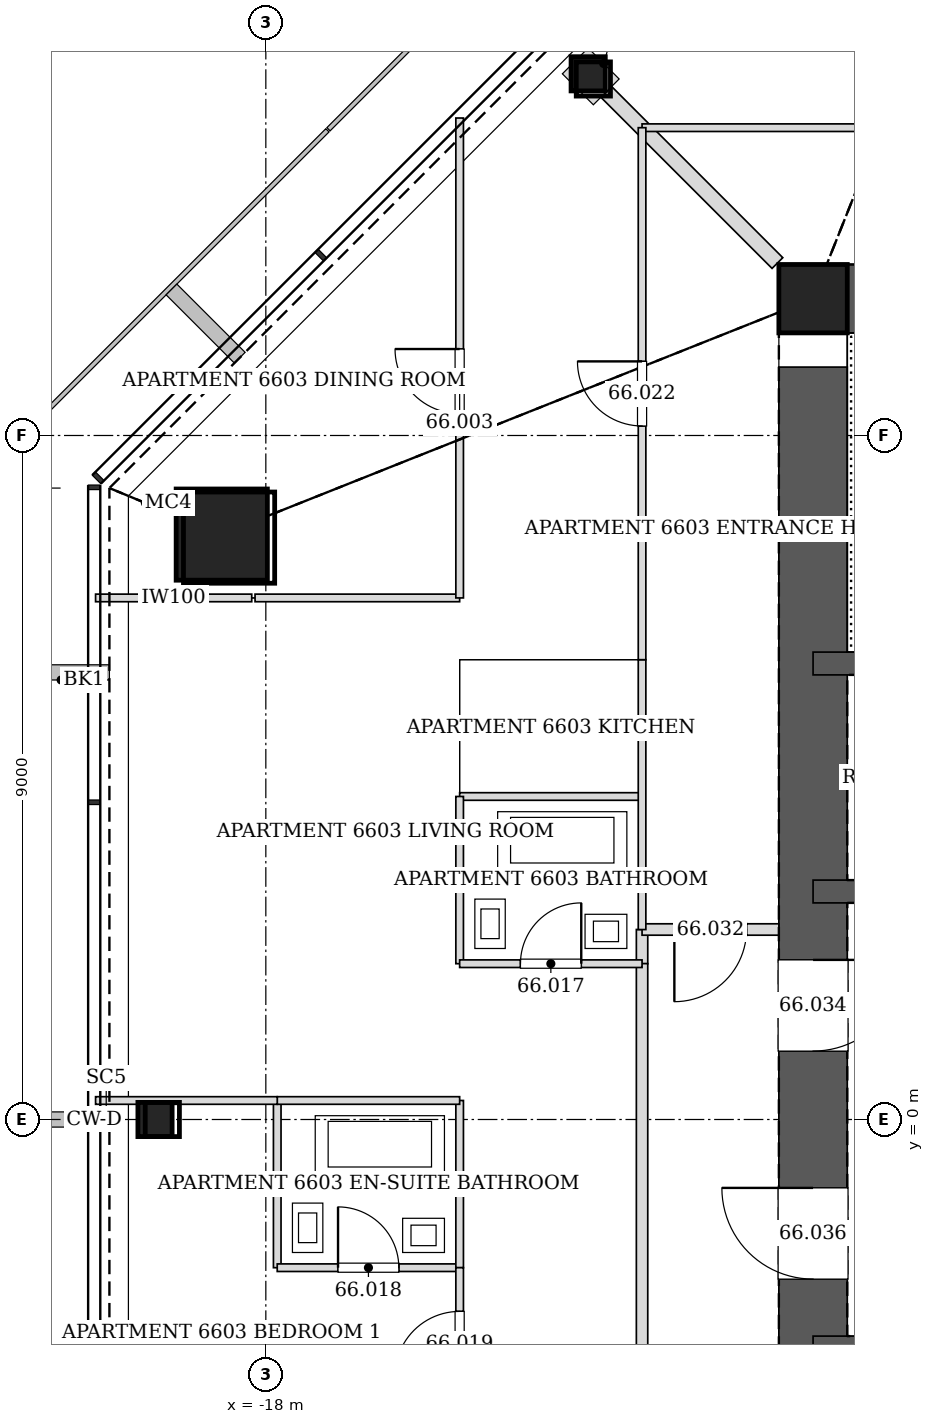
"""IFC4 building model, lengths in metres.
Left out: names, types, materials, properties, quantities, classifications, styles, units other than length and angle.
Written with IfcOpenShell. Run it as: python <this file> out.ifc"""

import sys

from ifc_helpers import new_model, si_unit, direction, frame, frame_2d, origin, origin_2d, place, context, subcontext, project, spatial, rectangle, hollow_rectangle, extrude, element, fill, save


model = new_model("IFC4")
c1 = context("Model", 3, precision=1e-05, world=origin(), true_north=direction((0.0, 1.0)))
c2 = subcontext(c1, "Body", "Model", "MODEL_VIEW")
j1 = project(units=[si_unit("LENGTHUNIT", "METRE"), si_unit("PLANEANGLEUNIT", "RADIAN")], contexts=[c1])
p1 = place(None, origin())
s1 = spatial("IfcSite", under=j1, at=p1, CompositionType="ELEMENT")
p2 = place(p1, origin())
s2 = spatial("IfcBuilding", under=s1, at=p2, CompositionType="ELEMENT")
p3 = place(p2, frame((0.0, 0.0, 274.2)))
s3 = spatial("IfcBuildingStorey", under=s2, at=p3, CompositionType="ELEMENT", Elevation=274.2)
p4 = place(p3, frame((-18.58, 7.696, 0.0), z_axis=(0.028277121884, -0.011698403216, 0.999531666202), x_axis=(0.382282742426, 0.924045401938, 0.0)))
e1 = element("IfcColumn", 1, at=p4, inside=s3, PredefinedType="COLUMN", context=c2, shape_type="SweptSolid", body=[
    extrude(hollow_rectangle(XDim=1.2, YDim=1.2, WallThickness=0.055, at=origin_2d()), origin(), (0.0, 0.0, 1.0), 3.402),
])
for number, where, z_axis, x_axis in (
    (2, (-13.759, 13.759, 0.0), (0.02, -0.02, 1.0), (0.707, 0.707, 0.0)),
    (3, (-19.458, 0.0, 0.0), (0.028, 0.0, 1.0), (0.0, 1.0, 0.0)),
):
    element("IfcColumn", number, at=place(p3, frame(where, z_axis=z_axis, x_axis=x_axis)), inside=s3, PredefinedType="COLUMN", context=c2, shape_type="SweptSolid", body=[
        extrude(hollow_rectangle(XDim=0.45, YDim=0.45, WallThickness=0.02, at=origin_2d()), origin(), (0.0, 0.0, 1.0), 3.402),
    ])
p5 = place(p3, frame((-10.8, 10.8, 0.0), z_axis=(0.0, 0.0, 1.0), x_axis=(1.0, 0.0, 0.0)))
e4 = element("IfcColumn", 4, at=p5, inside=s3, PredefinedType="COLUMN", context=c2, shape_type="SweptSolid", body=[
    extrude(hollow_rectangle(XDim=0.9, YDim=0.9, WallThickness=0.04, at=origin_2d()), origin(), (0.0, 0.0, 1.0), 3.4),
])
p6 = place(p3, frame((10.8, 10.8, 0.0), z_axis=(0.0, 0.0, 1.0), x_axis=(-1.0, 0.0, 0.0)))
e5 = element("IfcWall", 5, at=p6, inside=s3, PredefinedType="SOLIDWALL", context=c2, shape_type="SweptSolid", body=[
    extrude(rectangle(XDim=21.6, YDim=0.9, at=frame_2d((10.8, 0.0))), origin(), (0.0, 0.0, 1.0), 3.4),
])
p7 = place(p6, frame((10.05, 0.0, 0.0)))
e6 = element("IfcOpeningElement", 6, at=p7, cuts=e5, PredefinedType="OPENING", context=c2, shape_type="SweptSolid", body=[
    extrude(rectangle(XDim=1.5, YDim=2.1, at=frame_2d((0.75, 1.05))), frame((0.0, 0.46, 0.0), z_axis=(0.0, -1.0, 0.0), x_axis=(1.0, 0.0, 0.0)), (0.0, 0.0, 1.0), 0.92),
])
p8 = place(p3, frame((-10.8, 10.8, 0.0), z_axis=(0.0, 0.0, 1.0), x_axis=(0.0, -1.0, 0.0)))
e7 = element("IfcWall", 7, at=p8, inside=s3, PredefinedType="SOLIDWALL", context=c2, shape_type="SweptSolid", body=[
    extrude(rectangle(XDim=21.6, YDim=0.9, at=frame_2d((10.8, 0.0))), origin(), (0.0, 0.0, 1.0), 3.4),
])
p9 = place(p8, frame((8.7, 0.0, 0.0)))
e8 = element("IfcOpeningElement", 8, at=p9, cuts=e7, PredefinedType="OPENING", context=c2, shape_type="SweptSolid", body=[
    extrude(rectangle(XDim=1.2, YDim=2.1, at=frame_2d((0.6, 1.05))), frame((0.0, 0.46, 0.0), z_axis=(0.0, -1.0, 0.0), x_axis=(1.0, 0.0, 0.0)), (0.0, 0.0, 1.0), 0.92),
])
p10 = place(p8, frame((11.7, 0.0, 0.0)))
e9 = element("IfcOpeningElement", 9, at=p10, cuts=e7, PredefinedType="OPENING", context=c2, shape_type="SweptSolid", body=[
    extrude(rectangle(XDim=1.2, YDim=2.1, at=frame_2d((0.6, 1.05))), frame((0.0, 0.46, 0.0), z_axis=(0.0, -1.0, 0.0), x_axis=(1.0, 0.0, 0.0)), (0.0, 0.0, 1.0), 0.92),
])
p11 = place(p3, frame((-10.8, 3.0, 0.0), z_axis=(0.0, 0.0, 1.0), x_axis=(1.0, 0.0, 0.0)))
e10 = element("IfcWall", 10, at=p11, inside=s3, PredefinedType="SOLIDWALL", context=c2, shape_type="SweptSolid", body=[
    extrude(rectangle(XDim=21.6, YDim=0.3, at=frame_2d((10.8, 0.0))), origin(), (0.0, 0.0, 1.0), 3.4),
])
p12 = place(p11, frame((1.65, 0.0, 0.0)))
e11 = element("IfcOpeningElement", 11, at=p12, cuts=e10, PredefinedType="OPENING", context=c2, shape_type="SweptSolid", body=[
    extrude(rectangle(XDim=0.9, YDim=2.1, at=frame_2d((0.45, 1.05))), frame((0.0, 0.16, 0.0), z_axis=(0.0, -1.0, 0.0), x_axis=(1.0, 0.0, 0.0)), (0.0, 0.0, 1.0), 0.32),
])
p13 = place(p11, frame((4.55, 0.0, 0.0)))
e12 = element("IfcOpeningElement", 12, at=p13, cuts=e10, PredefinedType="OPENING", context=c2, shape_type="SweptSolid", body=[
    extrude(rectangle(XDim=0.9, YDim=2.1, at=frame_2d((0.45, 1.05))), frame((0.0, 0.16, 0.0), z_axis=(0.0, -1.0, 0.0), x_axis=(1.0, 0.0, 0.0)), (0.0, 0.0, 1.0), 0.32),
])
p14 = place(p11, frame((7.45, 0.0, 0.0)))
e13 = element("IfcOpeningElement", 13, at=p14, cuts=e10, PredefinedType="OPENING", context=c2, shape_type="SweptSolid", body=[
    extrude(rectangle(XDim=0.9, YDim=2.1, at=frame_2d((0.45, 1.05))), frame((0.0, 0.16, 0.0), z_axis=(0.0, -1.0, 0.0), x_axis=(1.0, 0.0, 0.0)), (0.0, 0.0, 1.0), 0.32),
])
p15 = place(p11, frame((13.25, 0.0, 0.0)))
e14 = element("IfcOpeningElement", 14, at=p15, cuts=e10, PredefinedType="OPENING", context=c2, shape_type="SweptSolid", body=[
    extrude(rectangle(XDim=0.9, YDim=2.1, at=frame_2d((0.45, 1.05))), frame((0.0, 0.16, 0.0), z_axis=(0.0, -1.0, 0.0), x_axis=(1.0, 0.0, 0.0)), (0.0, 0.0, 1.0), 0.32),
])
p16 = place(p11, frame((16.15, 0.0, 0.0)))
e15 = element("IfcOpeningElement", 15, at=p16, cuts=e10, PredefinedType="OPENING", context=c2, shape_type="SweptSolid", body=[
    extrude(rectangle(XDim=0.9, YDim=2.1, at=frame_2d((0.45, 1.05))), frame((0.0, 0.16, 0.0), z_axis=(0.0, -1.0, 0.0), x_axis=(1.0, 0.0, 0.0)), (0.0, 0.0, 1.0), 0.32),
])
p17 = place(p11, frame((19.05, 0.0, 0.0)))
e16 = element("IfcOpeningElement", 16, at=p17, cuts=e10, PredefinedType="OPENING", context=c2, shape_type="SweptSolid", body=[
    extrude(rectangle(XDim=0.9, YDim=2.1, at=frame_2d((0.45, 1.05))), frame((0.0, 0.16, 0.0), z_axis=(0.0, -1.0, 0.0), x_axis=(1.0, 0.0, 0.0)), (0.0, 0.0, 1.0), 0.32),
])
p18 = place(p3, frame((-10.8, 6.0, 0.0), z_axis=(0.0, 0.0, 1.0), x_axis=(1.0, 0.0, 0.0)))
e17 = element("IfcWall", 17, at=p18, inside=s3, PredefinedType="SOLIDWALL", context=c2, shape_type="SweptSolid", body=[
    extrude(rectangle(XDim=21.6, YDim=0.3, at=frame_2d((10.8, 0.0))), origin(), (0.0, 0.0, 1.0), 3.4),
])
p19 = place(p18, frame((10.25, 0.0, 0.0)))
e18 = element("IfcOpeningElement", 18, at=p19, cuts=e17, PredefinedType="OPENING", context=c2, shape_type="SweptSolid", body=[
    extrude(rectangle(XDim=1.1, YDim=2.1, at=frame_2d((0.55, 1.05))), frame((0.0, 0.16, 0.0), z_axis=(0.0, -1.0, 0.0), x_axis=(1.0, 0.0, 0.0)), (0.0, 0.0, 1.0), 0.32),
])
p20 = place(p3, frame((-10.8, -3.0, 0.0), z_axis=(0.0, 0.0, 1.0), x_axis=(1.0, 0.0, 0.0)))
e19 = element("IfcWall", 19, at=p20, inside=s3, PredefinedType="SOLIDWALL", context=c2, shape_type="SweptSolid", body=[
    extrude(rectangle(XDim=21.6, YDim=0.3, at=frame_2d((10.8, 0.0))), origin(), (0.0, 0.0, 1.0), 3.4),
])
p21 = place(p20, frame((13.25, 0.0, 0.0)))
e20 = element("IfcOpeningElement", 20, at=p21, cuts=e19, PredefinedType="OPENING", context=c2, shape_type="SweptSolid", body=[
    extrude(rectangle(XDim=0.9, YDim=2.1, at=frame_2d((0.45, 1.05))), frame((0.0, 0.16, 0.0), z_axis=(0.0, -1.0, 0.0), x_axis=(1.0, 0.0, 0.0)), (0.0, 0.0, 1.0), 0.32),
])
p22 = place(p20, frame((1.65, 0.0, 0.0)))
e21 = element("IfcOpeningElement", 21, at=p22, cuts=e19, PredefinedType="OPENING", context=c2, shape_type="SweptSolid", body=[
    extrude(rectangle(XDim=0.9, YDim=2.1, at=frame_2d((0.45, 1.05))), frame((0.0, 0.16, 0.0), z_axis=(0.0, -1.0, 0.0), x_axis=(1.0, 0.0, 0.0)), (0.0, 0.0, 1.0), 0.32),
])
p23 = place(p20, frame((4.55, 0.0, 0.0)))
e22 = element("IfcOpeningElement", 22, at=p23, cuts=e19, PredefinedType="OPENING", context=c2, shape_type="SweptSolid", body=[
    extrude(rectangle(XDim=0.9, YDim=2.1, at=frame_2d((0.45, 1.05))), frame((0.0, 0.16, 0.0), z_axis=(0.0, -1.0, 0.0), x_axis=(1.0, 0.0, 0.0)), (0.0, 0.0, 1.0), 0.32),
])
p24 = place(p20, frame((7.45, 0.0, 0.0)))
e23 = element("IfcOpeningElement", 23, at=p24, cuts=e19, PredefinedType="OPENING", context=c2, shape_type="SweptSolid", body=[
    extrude(rectangle(XDim=0.9, YDim=2.1, at=frame_2d((0.45, 1.05))), frame((0.0, 0.16, 0.0), z_axis=(0.0, -1.0, 0.0), x_axis=(1.0, 0.0, 0.0)), (0.0, 0.0, 1.0), 0.32),
])
p25 = place(p20, frame((16.05, 0.0, 0.0)))
e24 = element("IfcOpeningElement", 24, at=p25, cuts=e19, PredefinedType="OPENING", context=c2, shape_type="SweptSolid", body=[
    extrude(rectangle(XDim=1.1, YDim=2.1, at=frame_2d((0.55, 1.05))), frame((0.0, 0.16, 0.0), z_axis=(0.0, -1.0, 0.0), x_axis=(1.0, 0.0, 0.0)), (0.0, 0.0, 1.0), 0.32),
])
p26 = place(p20, frame((18.95, 0.0, 0.0)))
e25 = element("IfcOpeningElement", 25, at=p26, cuts=e19, PredefinedType="OPENING", context=c2, shape_type="SweptSolid", body=[
    extrude(rectangle(XDim=1.1, YDim=2.1, at=frame_2d((0.55, 1.05))), frame((0.0, 0.16, 0.0), z_axis=(0.0, -1.0, 0.0), x_axis=(1.0, 0.0, 0.0)), (0.0, 0.0, 1.0), 0.32),
])
p27 = place(p3, frame((-13.05, 2.5, 0.0), z_axis=(0.0, 0.0, 1.0), x_axis=(0.0, -1.0, 0.0)))
e26 = element("IfcWall", 26, at=p27, inside=s3, PredefinedType="PARTITIONING", context=c2, shape_type="SweptSolid", body=[
    extrude(rectangle(XDim=0.451, YDim=0.15, at=frame_2d((0.226, 0.0))), origin(), (0.0, 0.0, 1.0), 3.2),
])
p28 = place(p3, frame((-13.05, 2.051, 0.0), z_axis=(0.0, 0.0, 1.0), x_axis=(0.0, -1.0, 0.0)))
e27 = element("IfcWall", 27, at=p28, inside=s3, PredefinedType="PARTITIONING", context=c2, shape_type="SweptSolid", body=[
    extrude(rectangle(XDim=9.602, YDim=0.15, at=frame_2d((4.801, 0.0))), origin(), (0.0, 0.0, 1.0), 2.344),
])
p29 = place(p3, frame((-11.25, 2.5, 0.0), z_axis=(0.0, 0.0, 1.0), x_axis=(-1.0, 0.0, 0.0)))
e28 = element("IfcWall", 28, at=p29, inside=s3, PredefinedType="PARTITIONING", context=c2, shape_type="SweptSolid", body=[
    extrude(rectangle(XDim=1.8, YDim=0.15, at=frame_2d((0.9, 0.0))), origin(), (0.0, 0.0, 1.0), 3.2),
])
p30 = place(p29, frame((0.425, 0.0, 0.0)))
e29 = element("IfcOpeningElement", 29, at=p30, cuts=e28, PredefinedType="OPENING", context=c2, shape_type="SweptSolid", body=[
    extrude(rectangle(XDim=0.95, YDim=2.1, at=frame_2d((0.475, 1.05))), frame((0.0, 0.085, 0.0), z_axis=(0.0, -1.0, 0.0), x_axis=(1.0, 0.0, 0.0)), (0.0, 0.0, 1.0), 0.17),
])
p31 = place(p3, frame((-20.24, 6.863, 0.0), z_axis=(0.0, 0.0, 1.0), x_axis=(1.0, 0.0, 0.0)))
e30 = element("IfcWall", 30, at=p31, inside=s3, PredefinedType="PARTITIONING", context=c2, shape_type="SweptSolid", body=[
    extrude(rectangle(XDim=2.054, YDim=0.1, at=frame_2d((1.027, 0.0))), origin(), (0.0, 0.0, 1.0), 2.74),
])
p32 = place(p3, frame((-18.142, 6.863, 0.0), z_axis=(0.0, 0.0, 1.0), x_axis=(1.0, 0.0, 0.0)))
e31 = element("IfcWall", 31, at=p32, inside=s3, PredefinedType="PARTITIONING", context=c2, shape_type="SweptSolid", body=[
    extrude(rectangle(XDim=2.692, YDim=0.1, at=frame_2d((1.346, 0.0))), origin(), (0.0, 0.0, 1.0), 2.591),
])
p33 = place(p3, frame((-15.45, 6.863, 0.0), z_axis=(0.0, 0.0, 1.0), x_axis=(0.0, 1.0, 0.0)))
e32 = element("IfcWall", 32, at=p33, inside=s3, PredefinedType="PARTITIONING", context=c2, shape_type="SweptSolid", body=[
    extrude(rectangle(XDim=6.314, YDim=0.1, at=frame_2d((3.157, 0.0))), origin(), (0.0, 0.0, 1.0), 2.428),
])
p34 = place(p33, frame((2.425, 0.0, 0.0)))
e33 = element("IfcOpeningElement", 33, at=p34, cuts=e32, PredefinedType="OPENING", context=c2, shape_type="SweptSolid", body=[
    extrude(rectangle(XDim=0.85, YDim=2.1, at=frame_2d((0.425, 1.05))), frame((0.0, 0.06, 0.0), z_axis=(0.0, -1.0, 0.0), x_axis=(1.0, 0.0, 0.0)), (0.0, 0.0, 1.0), 0.12),
])
p35 = place(p3, frame((-13.518, 13.518, 0.0), z_axis=(0.0, 0.0, 1.0), x_axis=(0.707106781187, -0.707106781187, 0.0)))
e34 = element("IfcWall", 34, at=p35, inside=s3, PredefinedType="PARTITIONING", context=c2, shape_type="SweptSolid", body=[
    extrude(rectangle(XDim=3.181, YDim=0.2, at=frame_2d((1.59, 0.0))), origin(), (0.0, 0.0, 1.0), 2.591),
])
p36 = place(p3, frame((-13.05, 13.05, 0.0), z_axis=(0.0, 0.0, 1.0), x_axis=(1.0, 0.0, 0.0)))
e35 = element("IfcWall", 35, at=p36, inside=s3, PredefinedType="PARTITIONING", context=c2, shape_type="SweptSolid", body=[
    extrude(rectangle(XDim=7.0, YDim=0.1, at=frame_2d((3.5, 0.0))), origin(), (0.0, 0.0, 1.0), 2.428),
])
p37 = place(p36, frame((3.075, 0.0, 0.0)))
e36 = element("IfcOpeningElement", 36, at=p37, cuts=e35, PredefinedType="OPENING", context=c2, shape_type="SweptSolid", body=[
    extrude(rectangle(XDim=0.85, YDim=2.1, at=frame_2d((0.425, 1.05))), frame((0.0, 0.06, 0.0), z_axis=(0.0, -1.0, 0.0), x_axis=(1.0, 0.0, 0.0)), (0.0, 0.0, 1.0), 0.12),
])
p38 = place(p3, frame((-15.45, 4.25, 0.0), z_axis=(0.0, 0.0, 1.0), x_axis=(1.0, 0.0, 0.0)))
e37 = element("IfcWall", 37, at=p38, inside=s3, PredefinedType="PARTITIONING", context=c2, shape_type="SweptSolid", body=[
    extrude(rectangle(XDim=2.4, YDim=0.1, at=frame_2d((1.2, 0.0))), origin(), (0.0, 0.0, 1.0), 2.591),
])
p39 = place(p3, frame((-13.05, 6.05, 0.0), z_axis=(0.0, 0.0, 1.0), x_axis=(0.0, -1.0, 0.0)))
e38 = element("IfcWall", 38, at=p39, inside=s3, PredefinedType="PARTITIONING", context=c2, shape_type="SweptSolid", body=[
    extrude(rectangle(XDim=3.551, YDim=0.1, at=frame_2d((1.775, 0.0))), origin(), (0.0, 0.0, 1.0), 3.2),
])
p40 = place(p3, frame((-15.45, 4.25, 0.0), z_axis=(0.0, 0.0, 1.0), x_axis=(0.0, -1.0, 0.0)))
e39 = element("IfcWall", 39, at=p40, inside=s3, PredefinedType="PARTITIONING", context=c2, shape_type="SweptSolid", body=[
    extrude(rectangle(XDim=2.2, YDim=0.1, at=frame_2d((1.1, 0.0))), origin(), (0.0, 0.0, 1.0), 3.2),
])
p41 = place(p3, frame((-15.45, 2.05, 0.0), z_axis=(0.0, 0.0, 1.0), x_axis=(1.0, 0.0, 0.0)))
e40 = element("IfcWall", 40, at=p41, inside=s3, PredefinedType="PARTITIONING", context=c2, shape_type="SweptSolid", body=[
    extrude(rectangle(XDim=2.4, YDim=0.1, at=frame_2d((1.2, 0.0))), origin(), (0.0, 0.0, 1.0), 2.591),
])
p42 = place(p41, frame((0.8, 0.0, 0.0)))
e41 = element("IfcOpeningElement", 41, at=p42, cuts=e40, PredefinedType="OPENING", context=c2, shape_type="SweptSolid", body=[
    extrude(rectangle(XDim=0.8, YDim=2.1, at=frame_2d((0.4, 1.05))), frame((0.0, 0.06, 0.0), z_axis=(0.0, -1.0, 0.0), x_axis=(1.0, 0.0, 0.0)), (0.0, 0.0, 1.0), 0.12),
])
p43 = place(p3, frame((-17.85, 0.25, 0.0), z_axis=(0.0, 0.0, 1.0), x_axis=(0.0, -1.0, 0.0)))
e42 = element("IfcWall", 42, at=p43, inside=s3, PredefinedType="PARTITIONING", context=c2, shape_type="SweptSolid", body=[
    extrude(rectangle(XDim=2.2, YDim=0.1, at=frame_2d((1.1, 0.0))), origin(), (0.0, 0.0, 1.0), 2.344),
])
p44 = place(p3, frame((-17.85, -1.95, 0.0), z_axis=(0.0, 0.0, 1.0), x_axis=(1.0, 0.0, 0.0)))
e43 = element("IfcWall", 43, at=p44, inside=s3, PredefinedType="PARTITIONING", context=c2, shape_type="SweptSolid", body=[
    extrude(rectangle(XDim=2.4, YDim=0.1, at=frame_2d((1.2, 0.0))), origin(), (0.0, 0.0, 1.0), 2.591),
])
p45 = place(p44, frame((0.8, 0.0, 0.0)))
e44 = element("IfcOpeningElement", 44, at=p45, cuts=e43, PredefinedType="OPENING", context=c2, shape_type="SweptSolid", body=[
    extrude(rectangle(XDim=0.8, YDim=2.1, at=frame_2d((0.4, 1.05))), frame((0.0, 0.06, 0.0), z_axis=(0.0, -1.0, 0.0), x_axis=(1.0, 0.0, 0.0)), (0.0, 0.0, 1.0), 0.12),
])
p46 = place(p3, frame((-15.45, -1.95, 0.0), z_axis=(0.0, 0.0, 1.0), x_axis=(0.0, 1.0, 0.0)))
e45 = element("IfcWall", 45, at=p46, inside=s3, PredefinedType="PARTITIONING", context=c2, shape_type="SweptSolid", body=[
    extrude(rectangle(XDim=2.2, YDim=0.1, at=frame_2d((1.1, 0.0))), origin(), (0.0, 0.0, 1.0), 2.344),
])
p47 = place(p3, frame((-15.45, 0.25, 0.0), z_axis=(0.0, 0.0, 1.0), x_axis=(-1.0, 0.0, 0.0)))
e46 = element("IfcWall", 46, at=p47, inside=s3, PredefinedType="PARTITIONING", context=c2, shape_type="SweptSolid", body=[
    extrude(rectangle(XDim=2.4, YDim=0.1, at=frame_2d((1.2, 0.0))), origin(), (0.0, 0.0, 1.0), 2.591),
])
p48 = place(p3, frame((-17.85, 0.25, 0.0), z_axis=(0.0, 0.0, 1.0), x_axis=(-1.0, 0.0, 0.0)))
e47 = element("IfcWall", 47, at=p48, inside=s3, PredefinedType="PARTITIONING", context=c2, shape_type="SweptSolid", body=[
    extrude(rectangle(XDim=2.39, YDim=0.1, at=frame_2d((1.195, 0.0))), origin(), (0.0, 0.0, 1.0), 2.74),
])
p49 = place(p3, frame((-15.45, -1.95, 0.0), z_axis=(0.0, 0.0, 1.0), x_axis=(0.0, -1.0, 0.0)))
e48 = element("IfcWall", 48, at=p49, inside=s3, PredefinedType="PARTITIONING", context=c2, shape_type="SweptSolid", body=[
    extrude(rectangle(XDim=5.6, YDim=0.1, at=frame_2d((2.8, 0.0))), origin(), (0.0, 0.0, 1.0), 3.2),
])
p50 = place(p49, frame((0.575, 0.0, 0.0)))
e49 = element("IfcOpeningElement", 49, at=p50, cuts=e48, PredefinedType="OPENING", context=c2, shape_type="SweptSolid", body=[
    extrude(rectangle(XDim=0.85, YDim=2.1, at=frame_2d((0.425, 1.05))), frame((0.0, 0.06, 0.0), z_axis=(0.0, -1.0, 0.0), x_axis=(1.0, 0.0, 0.0)), (0.0, 0.0, 1.0), 0.12),
])
p51 = place(p49, frame((3.375, 0.0, 0.0)))
e50 = element("IfcOpeningElement", 50, at=p51, cuts=e48, PredefinedType="OPENING", context=c2, shape_type="SweptSolid", body=[
    extrude(rectangle(XDim=0.85, YDim=2.1, at=frame_2d((0.425, 1.05))), frame((0.0, 0.06, 0.0), z_axis=(0.0, -1.0, 0.0), x_axis=(1.0, 0.0, 0.0)), (0.0, 0.0, 1.0), 0.12),
])
p52 = place(p3, frame((-13.05, 6.05, 0.0), z_axis=(0.0, 0.0, 1.0), x_axis=(0.0, 1.0, 0.0)))
e51 = element("IfcWall", 51, at=p52, inside=s3, PredefinedType="PARTITIONING", context=c2, shape_type="SweptSolid", body=[
    extrude(rectangle(XDim=7.0, YDim=0.1, at=frame_2d((3.5, 0.0))), origin(), (0.0, 0.0, 1.0), 2.428),
])
p53 = place(p52, frame((3.075, 0.0, 0.0)))
e52 = element("IfcOpeningElement", 52, at=p53, cuts=e51, PredefinedType="OPENING", context=c2, shape_type="SweptSolid", body=[
    extrude(rectangle(XDim=0.85, YDim=2.1, at=frame_2d((0.425, 1.05))), frame((0.0, 0.06, 0.0), z_axis=(0.0, -1.0, 0.0), x_axis=(1.0, 0.0, 0.0)), (0.0, 0.0, 1.0), 0.12),
])
p54 = place(p34, origin())
e53 = element("IfcDoor", 53, at=p54, inside=s3, OperationType="SINGLE_SWING_RIGHT", PredefinedType="DOOR", context=c2, shape_type="SweptSolid", body=[
    extrude(rectangle(XDim=0.85, YDim=2.1, at=frame_2d((0.425, 1.05))), frame((0.0, 0.025, 0.0), z_axis=(0.0, -1.0, 0.0), x_axis=(1.0, 0.0, 0.0)), (0.0, 0.0, 1.0), 0.05),
])
fill(e33, e53)
p55 = place(p42, origin())
e54 = element("IfcDoor", 54, at=p55, inside=s3, OperationType="SINGLE_SWING_RIGHT", PredefinedType="DOOR", context=c2, shape_type="SweptSolid", body=[
    extrude(rectangle(XDim=0.8, YDim=2.1, at=frame_2d((0.4, 1.05))), frame((0.0, 0.025, 0.0), z_axis=(0.0, -1.0, 0.0), x_axis=(1.0, 0.0, 0.0)), (0.0, 0.0, 1.0), 0.05),
])
fill(e41, e54)
p56 = place(p45, origin())
e55 = element("IfcDoor", 55, at=p56, inside=s3, OperationType="SINGLE_SWING_LEFT", PredefinedType="DOOR", context=c2, shape_type="SweptSolid", body=[
    extrude(rectangle(XDim=0.8, YDim=2.1, at=frame_2d((0.4, 1.05))), frame((0.0, 0.025, 0.0), z_axis=(0.0, -1.0, 0.0), x_axis=(1.0, 0.0, 0.0)), (0.0, 0.0, 1.0), 0.05),
])
fill(e44, e55)
p57 = place(p50, frame((0.85, 0.0, 0.0), z_axis=(0.0, 0.0, 1.0), x_axis=(-1.0, 0.0, 0.0)))
e56 = element("IfcDoor", 56, at=p57, inside=s3, OperationType="SINGLE_SWING_LEFT", PredefinedType="DOOR", context=c2, shape_type="SweptSolid", body=[
    extrude(rectangle(XDim=0.85, YDim=2.1, at=frame_2d((0.425, 1.05))), frame((0.0, 0.025, 0.0), z_axis=(0.0, -1.0, 0.0), x_axis=(1.0, 0.0, 0.0)), (0.0, 0.0, 1.0), 0.05),
])
fill(e49, e56)
p58 = place(p53, origin())
e57 = element("IfcDoor", 57, at=p58, inside=s3, OperationType="SINGLE_SWING_RIGHT", PredefinedType="DOOR", context=c2, shape_type="SweptSolid", body=[
    extrude(rectangle(XDim=0.85, YDim=2.1, at=frame_2d((0.425, 1.05))), frame((0.0, 0.025, 0.0), z_axis=(0.0, -1.0, 0.0), x_axis=(1.0, 0.0, 0.0)), (0.0, 0.0, 1.0), 0.05),
])
fill(e52, e57)
p59 = place(p30, origin())
e58 = element("IfcDoor", 58, at=p59, inside=s3, OperationType="SINGLE_SWING_RIGHT", PredefinedType="DOOR", context=c2, shape_type="SweptSolid", body=[
    extrude(rectangle(XDim=0.95, YDim=2.1, at=frame_2d((0.475, 1.05))), frame((0.0, 0.025, 0.0), z_axis=(0.0, -1.0, 0.0), x_axis=(1.0, 0.0, 0.0)), (0.0, 0.0, 1.0), 0.05),
])
fill(e29, e58)
p60 = place(p9, origin())
e59 = element("IfcDoor", 59, at=p60, inside=s3, OperationType="SINGLE_SWING_LEFT", PredefinedType="DOOR", context=c2, shape_type="SweptSolid", body=[
    extrude(rectangle(XDim=1.2, YDim=2.1, at=frame_2d((0.6, 1.05))), frame((0.0, 0.025, 0.0), z_axis=(0.0, -1.0, 0.0), x_axis=(1.0, 0.0, 0.0)), (0.0, 0.0, 1.0), 0.05),
])
fill(e8, e59)
p61 = place(p10, frame((1.2, 0.0, 0.0), z_axis=(0.0, 0.0, 1.0), x_axis=(-1.0, 0.0, 0.0)))
e60 = element("IfcDoor", 60, at=p61, inside=s3, OperationType="SINGLE_SWING_RIGHT", PredefinedType="DOOR", context=c2, shape_type="SweptSolid", body=[
    extrude(rectangle(XDim=1.2, YDim=2.1, at=frame_2d((0.6, 1.05))), frame((0.0, 0.025, 0.0), z_axis=(0.0, -1.0, 0.0), x_axis=(1.0, 0.0, 0.0)), (0.0, 0.0, 1.0), 0.05),
])
fill(e9, e60)
save(model, sys.argv[1])
